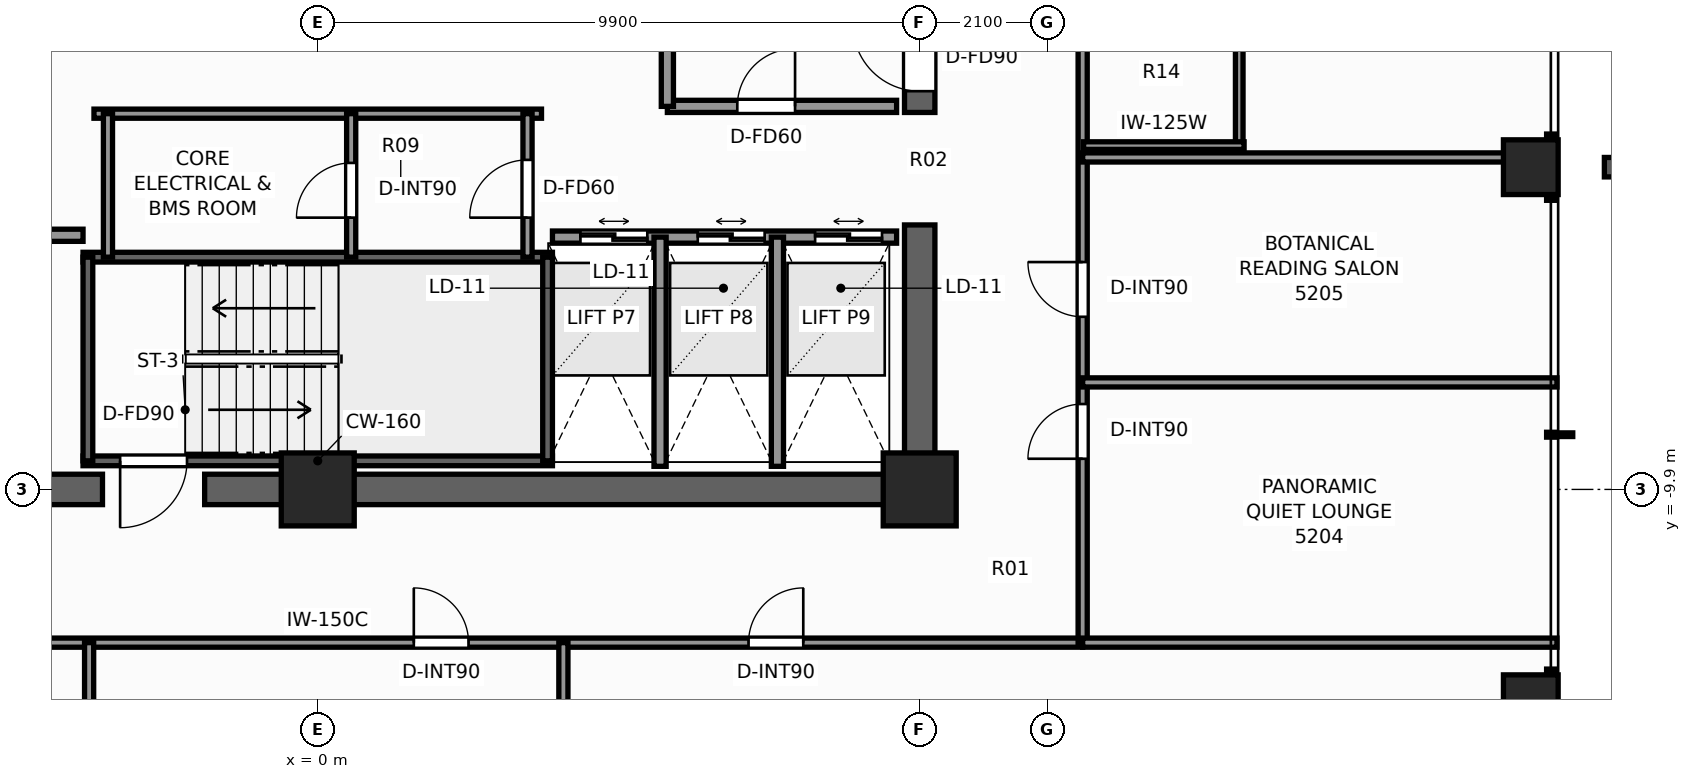
"""IFC4 building model, lengths in metres.
Left out: names, types, materials, properties, quantities, classifications, styles, units other than length and angle.
Written with IfcOpenShell. Run it as: python <this file> out.ifc"""

import sys

from ifc_helpers import new_model, si_unit, direction, frame, frame_2d, origin, origin_2d, place, context, subcontext, project, spatial, rectangle, extrude, element, fill, save


model = new_model("IFC4")
c1 = context("Model", 3, precision=1e-05, world=origin(), true_north=direction((0.0, 1.0)))
c2 = subcontext(c1, "Body", "Model", "MODEL_VIEW")
j1 = project(units=[si_unit("LENGTHUNIT", "METRE"), si_unit("PLANEANGLEUNIT", "RADIAN")], contexts=[c1])
p1 = place(None, origin())
s1 = spatial("IfcSite", under=j1, at=p1, CompositionType="ELEMENT")
p2 = place(p1, origin())
s2 = spatial("IfcBuilding", under=s1, at=p2, CompositionType="ELEMENT")
p3 = place(p2, frame((0.0, 0.0, 180.0)))
s3 = spatial("IfcBuildingStorey", under=s2, at=p3, CompositionType="ELEMENT", Elevation=180.0)
p4 = place(p3, frame((10.15, -9.9, 0.0), z_axis=(0.0, 0.0, 1.0), x_axis=(-1.0, 0.0, 0.0)))
e1 = element("IfcWall", 1, at=p4, inside=s3, PredefinedType="SHEAR", context=c2, shape_type="SweptSolid", body=[
    extrude(rectangle(XDim=12.01, YDim=0.5, at=frame_2d((6.005, 0.0))), origin(), (0.0, 0.0, 1.0), 3.3),
])
p5 = place(p3, frame((-3.54, -9.9, 0.0), z_axis=(0.0, 0.0, 1.0), x_axis=(-1.0, 0.0, 0.0)))
e2 = element("IfcWall", 2, at=p5, inside=s3, PredefinedType="SHEAR", context=c2, shape_type="SweptSolid", body=[
    extrude(rectangle(XDim=6.61, YDim=0.5, at=frame_2d((3.305, 0.0))), origin(), (0.0, 0.0, 1.0), 3.3),
])
p6 = place(p3, frame((9.9, -9.65, 0.0), z_axis=(0.0, 0.0, 1.0), x_axis=(0.0, 1.0, 0.0)))
e3 = element("IfcWall", 3, at=p6, inside=s3, PredefinedType="SHEAR", context=c2, shape_type="SweptSolid", body=[
    extrude(rectangle(XDim=4.1, YDim=0.5, at=frame_2d((2.05, 0.0))), origin(), (0.0, 0.0, 1.0), 3.3),
])
p7 = place(p3, frame((9.9, -3.7, 0.0), z_axis=(0.0, 0.0, 1.0), x_axis=(0.0, 1.0, 0.0)))
e4 = element("IfcWall", 4, at=p7, inside=s3, PredefinedType="SHEAR", context=c2, shape_type="SweptSolid", body=[
    extrude(rectangle(XDim=13.35, YDim=0.5, at=frame_2d((6.675, 0.0))), origin(), (0.0, 0.0, 1.0), 3.3),
])
p8 = place(p7, frame((0.35, 0.0, 0.0)))
e5 = element("IfcOpeningElement", 5, at=p8, cuts=e4, PredefinedType="OPENING", context=c2, shape_type="SweptSolid", body=[
    extrude(rectangle(XDim=1.1, YDim=2.2, at=frame_2d((0.55, 1.1))), frame((0.0, 0.26, 0.0), z_axis=(0.0, -1.0, 0.0), x_axis=(1.0, 0.0, 0.0)), (0.0, 0.0, 1.0), 0.52),
])
for number, where, z_axis, x_axis in (
    (6, (9.9, -9.9, 0.0), (0.0, 0.0, 1.0), (1.0, 0.0, 0.0)),
    (7, (0.0, -9.9, 0.0), (0.0, 0.0, 1.0), (1.0, 0.0, 0.0)),
):
    element("IfcColumn", number, at=place(p3, frame(where, z_axis=z_axis, x_axis=x_axis)), inside=s3, PredefinedType="COLUMN", context=c2, shape_type="SweptSolid", body=[
        extrude(rectangle(XDim=1.2, YDim=1.2, at=origin_2d()), origin(), (0.0, 0.0, 1.0), 3.3),
    ])
for number, where, z_axis, x_axis in (
    (8, (19.95, -13.4, 0.0), (0.0, 0.0, 1.0), (1.0, 0.0, 0.0)),
    (9, (19.95, -4.6, 0.0), (0.0, 0.0, 1.0), (1.0, 0.0, 0.0)),
):
    element("IfcColumn", number, at=place(p3, frame(where, z_axis=z_axis, x_axis=x_axis)), inside=s3, PredefinedType="COLUMN", context=c2, shape_type="SweptSolid", body=[
        extrude(rectangle(XDim=0.9, YDim=0.9, at=origin_2d()), origin(), (0.0, 0.0, 1.0), 3.3),
    ])
p9 = place(p3, frame((3.86, -9.43, 0.0), z_axis=(0.0, 0.0, 1.0), x_axis=(-1.0, 0.0, 0.0)))
e10 = element("IfcWall", 10, at=p9, inside=s3, PredefinedType="SHEAR", context=c2, shape_type="SweptSolid", body=[
    extrude(rectangle(XDim=7.72, YDim=0.16, at=frame_2d((3.86, 0.0))), origin(), (0.0, 0.0, 1.0), 3.3),
])
p10 = place(p9, frame((6.01, 0.0, 0.0)))
e11 = element("IfcOpeningElement", 11, at=p10, cuts=e10, PredefinedType="OPENING", context=c2, shape_type="SweptSolid", body=[
    extrude(rectangle(XDim=1.1, YDim=2.2, at=frame_2d((0.55, 1.1))), frame((0.0, 0.09, 0.0), z_axis=(0.0, -1.0, 0.0), x_axis=(1.0, 0.0, 0.0)), (0.0, 0.0, 1.0), 0.18),
])
p11 = place(p3, frame((-3.86, -6.08, 0.0), z_axis=(0.0, 0.0, 1.0), x_axis=(1.0, 0.0, 0.0)))
e12 = element("IfcWall", 12, at=p11, inside=s3, PredefinedType="SHEAR", context=c2, shape_type="SweptSolid", body=[
    extrude(rectangle(XDim=7.72, YDim=0.16, at=frame_2d((3.86, 0.0))), origin(), (0.0, 0.0, 1.0), 3.3),
])
for number, where, z_axis, x_axis in (
    (13, (-3.78, -9.43, 0.0), (0.0, 0.0, 1.0), (0.0, 1.0, 0.0)),
    (14, (3.78, -9.43, 0.0), (0.0, 0.0, 1.0), (0.0, 1.0, 0.0)),
):
    element("IfcWall", number, at=place(p3, frame(where, z_axis=z_axis, x_axis=x_axis)), inside=s3, PredefinedType="SHEAR", context=c2, shape_type="SweptSolid", body=[
        extrude(rectangle(XDim=3.35, YDim=0.16, at=frame_2d((1.675, 0.0))), origin(), (0.0, 0.0, 1.0), 3.3),
    ])
p12 = place(p3, frame((5.75, -3.6, 0.0), z_axis=(0.0, 0.0, 1.0), x_axis=(1.0, 0.0, 0.0)))
e15 = element("IfcWall", 15, at=p12, inside=s3, PredefinedType="SOLIDWALL", context=c2, shape_type="SweptSolid", body=[
    extrude(rectangle(XDim=3.77, YDim=0.2, at=frame_2d((1.885, 0.0))), origin(), (0.0, 0.0, 1.0), 3.08),
])
p13 = place(p12, frame((1.15, 0.0, 0.0)))
e16 = element("IfcOpeningElement", 16, at=p13, cuts=e15, PredefinedType="OPENING", context=c2, shape_type="SweptSolid", body=[
    extrude(rectangle(XDim=0.95, YDim=2.06, at=frame_2d((0.475, 1.03))), frame((0.0, 0.11, 0.0), z_axis=(0.0, -1.0, 0.0), x_axis=(1.0, 0.0, 0.0)), (0.0, 0.0, 1.0), 0.22),
])
p14 = place(p3, frame((5.75, -3.6, 0.0), z_axis=(0.0, 0.0, 1.0), x_axis=(0.0, 1.0, 0.0)))
e17 = element("IfcWall", 17, at=p14, inside=s3, PredefinedType="SOLIDWALL", context=c2, shape_type="SweptSolid", body=[
    extrude(rectangle(XDim=5.57, YDim=0.2, at=frame_2d((2.785, 0.0))), origin(), (0.0, 0.0, 1.0), 2.715),
])
p15 = place(p14, frame((2.75, 0.0, 0.0)))
e18 = element("IfcOpeningElement", 18, at=p15, cuts=e17, PredefinedType="OPENING", context=c2, shape_type="SweptSolid", body=[
    extrude(rectangle(XDim=1.1, YDim=2.2, at=frame_2d((0.55, 1.1))), frame((0.0, 0.11, 0.0), z_axis=(0.0, -1.0, 0.0), x_axis=(1.0, 0.0, 0.0)), (0.0, 0.0, 1.0), 0.22),
])
p16 = place(p3, frame((-9.52, -5.72, 0.0), z_axis=(0.0, 0.0, 1.0), x_axis=(1.0, 0.0, 0.0)))
e19 = element("IfcWall", 19, at=p16, inside=s3, PredefinedType="SOLIDWALL", context=c2, shape_type="SweptSolid", body=[
    extrude(rectangle(XDim=5.66, YDim=0.2, at=frame_2d((2.83, 0.0))), origin(), (0.0, 0.0, 1.0), 3.08),
])
p17 = place(p16, frame((3.6, 0.0, 0.0)))
e20 = element("IfcOpeningElement", 20, at=p17, cuts=e19, PredefinedType="OPENING", context=c2, shape_type="SweptSolid", body=[
    extrude(rectangle(XDim=0.95, YDim=2.06, at=frame_2d((0.475, 1.03))), frame((0.0, 0.11, 0.0), z_axis=(0.0, -1.0, 0.0), x_axis=(1.0, 0.0, 0.0)), (0.0, 0.0, 1.0), 0.22),
])
p18 = place(p3, frame((3.86, -5.75, 0.0), z_axis=(0.0, 0.0, 1.0), x_axis=(1.0, 0.0, 0.0)))
e21 = element("IfcWall", 21, at=p18, inside=s3, PredefinedType="SOLIDWALL", context=c2, shape_type="SweptSolid", body=[
    extrude(rectangle(XDim=5.66, YDim=0.2, at=frame_2d((2.83, 0.0))), origin(), (0.0, 0.0, 1.0), 3.08),
])
p19 = place(p18, frame((0.46, 0.0, 0.0)))
e22 = element("IfcOpeningElement", 22, at=p19, cuts=e21, PredefinedType="OPENING", context=c2, shape_type="SweptSolid", body=[
    extrude(rectangle(XDim=1.1, YDim=2.2, at=frame_2d((0.55, 1.1))), frame((0.0, 0.11, 0.0), z_axis=(0.0, -1.0, 0.0), x_axis=(1.0, 0.0, 0.0)), (0.0, 0.0, 1.0), 0.22),
])
p20 = place(p18, frame((2.39, 0.0, 0.0)))
e23 = element("IfcOpeningElement", 23, at=p20, cuts=e21, PredefinedType="OPENING", context=c2, shape_type="SweptSolid", body=[
    extrude(rectangle(XDim=1.1, YDim=2.2, at=frame_2d((0.55, 1.1))), frame((0.0, 0.11, 0.0), z_axis=(0.0, -1.0, 0.0), x_axis=(1.0, 0.0, 0.0)), (0.0, 0.0, 1.0), 0.22),
])
p21 = place(p18, frame((4.32, 0.0, 0.0)))
e24 = element("IfcOpeningElement", 24, at=p21, cuts=e21, PredefinedType="OPENING", context=c2, shape_type="SweptSolid", body=[
    extrude(rectangle(XDim=1.1, YDim=2.2, at=frame_2d((0.55, 1.1))), frame((0.0, 0.11, 0.0), z_axis=(0.0, -1.0, 0.0), x_axis=(1.0, 0.0, 0.0)), (0.0, 0.0, 1.0), 0.22),
])
for number, where, z_axis, x_axis in (
    (25, (5.63, -9.52, 0.0), (0.0, 0.0, 1.0), (0.0, 1.0, 0.0)),
    (26, (7.56, -9.52, 0.0), (0.0, 0.0, 1.0), (0.0, 1.0, 0.0)),
):
    element("IfcWall", number, at=place(p3, frame(where, z_axis=z_axis, x_axis=x_axis)), inside=s3, PredefinedType="SOLIDWALL", context=c2, shape_type="SweptSolid", body=[
        extrude(rectangle(XDim=3.77, YDim=0.2, at=frame_2d((1.885, 0.0))), origin(), (0.0, 0.0, 1.0), 3.08),
    ])
p22 = place(p3, frame((-3.68, -3.72, 0.0), z_axis=(0.0, 0.0, 1.0), x_axis=(1.0, 0.0, 0.0)))
e27 = element("IfcWall", 27, at=p22, inside=s3, PredefinedType="PARTITIONING", context=c2, shape_type="SweptSolid", body=[
    extrude(rectangle(XDim=7.36, YDim=0.15, at=frame_2d((3.68, 0.0))), origin(), (0.0, 0.0, 1.0), 3.08),
])
p23 = place(p3, frame((3.45, -6.08, 0.0), z_axis=(0.0, 0.0, 1.0), x_axis=(0.0, 1.0, 0.0)))
e28 = element("IfcWall", 28, at=p23, inside=s3, PredefinedType="PARTITIONING", context=c2, shape_type="SweptSolid", body=[
    extrude(rectangle(XDim=2.36, YDim=0.15, at=frame_2d((1.18, 0.0))), origin(), (0.0, 0.0, 1.0), 3.08),
])
p24 = place(p23, frame((0.65, 0.0, 0.0)))
e29 = element("IfcOpeningElement", 29, at=p24, cuts=e28, PredefinedType="OPENING", context=c2, shape_type="SweptSolid", body=[
    extrude(rectangle(XDim=0.95, YDim=2.06, at=frame_2d((0.475, 1.03))), frame((0.0, 0.085, 0.0), z_axis=(0.0, -1.0, 0.0), x_axis=(1.0, 0.0, 0.0)), (0.0, 0.0, 1.0), 0.17),
])
p25 = place(p3, frame((-3.45, -6.08, 0.0), z_axis=(0.0, 0.0, 1.0), x_axis=(0.0, 1.0, 0.0)))
e30 = element("IfcWall", 30, at=p25, inside=s3, PredefinedType="PARTITIONING", context=c2, shape_type="SweptSolid", body=[
    extrude(rectangle(XDim=2.36, YDim=0.15, at=frame_2d((1.18, 0.0))), origin(), (0.0, 0.0, 1.0), 3.08),
])
p26 = place(p3, frame((0.55, -6.08, 0.0), z_axis=(0.0, 0.0, 1.0), x_axis=(0.0, 1.0, 0.0)))
e31 = element("IfcWall", 31, at=p26, inside=s3, PredefinedType="PARTITIONING", context=c2, shape_type="SweptSolid", body=[
    extrude(rectangle(XDim=2.36, YDim=0.15, at=frame_2d((1.18, 0.0))), origin(), (0.0, 0.0, 1.0), 3.08),
])
p27 = place(p26, frame((0.65, 0.0, 0.0)))
e32 = element("IfcOpeningElement", 32, at=p27, cuts=e31, PredefinedType="OPENING", context=c2, shape_type="SweptSolid", body=[
    extrude(rectangle(XDim=0.9, YDim=2.06, at=frame_2d((0.45, 1.03))), frame((0.0, 0.085, 0.0), z_axis=(0.0, -1.0, 0.0), x_axis=(1.0, 0.0, 0.0)), (0.0, 0.0, 1.0), 0.17),
])
p28 = place(p3, frame((-12.26, -12.42, 0.0), z_axis=(0.0, 0.0, 1.0), x_axis=(1.0, 0.0, 0.0)))
e33 = element("IfcWall", 33, at=p28, inside=s3, PredefinedType="PARTITIONING", context=c2, shape_type="SweptSolid", body=[
    extrude(rectangle(XDim=24.84, YDim=0.15, at=frame_2d((12.42, 0.0))), origin(), (0.0, 0.0, 1.0), 2.369),
])
p29 = place(p28, frame((4.275, 0.0, 0.0)))
e34 = element("IfcOpeningElement", 34, at=p29, cuts=e33, PredefinedType="OPENING", context=c2, shape_type="SweptSolid", body=[
    extrude(rectangle(XDim=0.9, YDim=2.06, at=frame_2d((0.45, 1.03))), frame((0.0, 0.085, 0.0), z_axis=(0.0, -1.0, 0.0), x_axis=(1.0, 0.0, 0.0)), (0.0, 0.0, 1.0), 0.17),
])
p30 = place(p28, frame((13.84, 0.0, 0.0)))
e35 = element("IfcOpeningElement", 35, at=p30, cuts=e33, PredefinedType="OPENING", context=c2, shape_type="SweptSolid", body=[
    extrude(rectangle(XDim=0.9, YDim=2.06, at=frame_2d((0.45, 1.03))), frame((0.0, 0.085, 0.0), z_axis=(0.0, -1.0, 0.0), x_axis=(1.0, 0.0, 0.0)), (0.0, 0.0, 1.0), 0.17),
])
p31 = place(p28, frame((19.345, 0.0, 0.0)))
e36 = element("IfcOpeningElement", 36, at=p31, cuts=e33, PredefinedType="OPENING", context=c2, shape_type="SweptSolid", body=[
    extrude(rectangle(XDim=0.9, YDim=2.06, at=frame_2d((0.45, 1.03))), frame((0.0, 0.085, 0.0), z_axis=(0.0, -1.0, 0.0), x_axis=(1.0, 0.0, 0.0)), (0.0, 0.0, 1.0), 0.17),
])
p32 = place(p3, frame((12.58, -12.42, 0.0), z_axis=(0.0, 0.0, 1.0), x_axis=(0.0, 1.0, 0.0)))
e37 = element("IfcWall", 37, at=p32, inside=s3, PredefinedType="PARTITIONING", context=c2, shape_type="SweptSolid", body=[
    extrude(rectangle(XDim=24.84, YDim=0.15, at=frame_2d((12.42, 0.0))), origin(), (0.0, 0.0, 1.0), 2.369),
])
p33 = place(p32, frame((3.024, 0.0, 0.0)))
e38 = element("IfcOpeningElement", 38, at=p33, cuts=e37, PredefinedType="OPENING", context=c2, shape_type="SweptSolid", body=[
    extrude(rectangle(XDim=0.9, YDim=2.06, at=frame_2d((0.45, 1.03))), frame((0.0, 0.085, 0.0), z_axis=(0.0, -1.0, 0.0), x_axis=(1.0, 0.0, 0.0)), (0.0, 0.0, 1.0), 0.17),
])
p34 = place(p32, frame((5.359, 0.0, 0.0)))
e39 = element("IfcOpeningElement", 39, at=p34, cuts=e37, PredefinedType="OPENING", context=c2, shape_type="SweptSolid", body=[
    extrude(rectangle(XDim=0.9, YDim=2.06, at=frame_2d((0.45, 1.03))), frame((0.0, 0.085, 0.0), z_axis=(0.0, -1.0, 0.0), x_axis=(1.0, 0.0, 0.0)), (0.0, 0.0, 1.0), 0.17),
])
p35 = place(p32, frame((11.067, 0.0, 0.0)))
e40 = element("IfcOpeningElement", 40, at=p35, cuts=e37, PredefinedType="OPENING", context=c2, shape_type="SweptSolid", body=[
    extrude(rectangle(XDim=0.95, YDim=2.06, at=frame_2d((0.475, 1.03))), frame((0.0, 0.085, 0.0), z_axis=(0.0, -1.0, 0.0), x_axis=(1.0, 0.0, 0.0)), (0.0, 0.0, 1.0), 0.17),
])
p36 = place(p32, frame((18.038, 0.0, 0.0)))
e41 = element("IfcOpeningElement", 41, at=p36, cuts=e37, PredefinedType="OPENING", context=c2, shape_type="SweptSolid", body=[
    extrude(rectangle(XDim=0.95, YDim=2.06, at=frame_2d((0.475, 1.03))), frame((0.0, 0.085, 0.0), z_axis=(0.0, -1.0, 0.0), x_axis=(1.0, 0.0, 0.0)), (0.0, 0.0, 1.0), 0.17),
])
p37 = place(p32, frame((20.184, 0.0, 0.0)))
e42 = element("IfcOpeningElement", 42, at=p37, cuts=e37, PredefinedType="OPENING", context=c2, shape_type="SweptSolid", body=[
    extrude(rectangle(XDim=0.95, YDim=2.06, at=frame_2d((0.475, 1.03))), frame((0.0, 0.085, 0.0), z_axis=(0.0, -1.0, 0.0), x_axis=(1.0, 0.0, 0.0)), (0.0, 0.0, 1.0), 0.17),
])
p38 = place(p3, frame((12.58, -12.42, 0.0), z_axis=(0.0, 0.0, 1.0), x_axis=(1.0, 0.0, 0.0)))
e43 = element("IfcWall", 43, at=p38, inside=s3, PredefinedType="PARTITIONING", context=c2, shape_type="SweptSolid", body=[
    extrude(rectangle(XDim=7.8, YDim=0.15, at=frame_2d((3.9, 0.0))), origin(), (0.0, 0.0, 1.0), 2.369),
])
for number, where, z_axis, x_axis in (
    (44, (-3.76, -20.38, 0.0), (0.0, 0.0, 1.0), (0.0, 1.0, 0.0)),
    (45, (4.04, -20.38, 0.0), (0.0, 0.0, 1.0), (0.0, 1.0, 0.0)),
):
    element("IfcWall", number, at=place(p3, frame(where, z_axis=z_axis, x_axis=x_axis)), inside=s3, PredefinedType="PARTITIONING", context=c2, shape_type="SweptSolid", body=[
        extrude(rectangle(XDim=7.96, YDim=0.15, at=frame_2d((3.98, 0.0))), origin(), (0.0, 0.0, 1.0), 2.453),
    ])
p39 = place(p3, frame((12.58, -8.14, 0.0), z_axis=(0.0, 0.0, 1.0), x_axis=(1.0, 0.0, 0.0)))
e46 = element("IfcWall", 46, at=p39, inside=s3, PredefinedType="PARTITIONING", context=c2, shape_type="SweptSolid", body=[
    extrude(rectangle(XDim=7.8, YDim=0.15, at=frame_2d((3.9, 0.0))), origin(), (0.0, 0.0, 1.0), 2.453),
])
p40 = place(p3, frame((12.58, -4.44, 0.0), z_axis=(0.0, 0.0, 1.0), x_axis=(1.0, 0.0, 0.0)))
e47 = element("IfcWall", 47, at=p40, inside=s3, PredefinedType="PARTITIONING", context=c2, shape_type="SweptSolid", body=[
    extrude(rectangle(XDim=7.8, YDim=0.15, at=frame_2d((3.9, 0.0))), origin(), (0.0, 0.0, 1.0), 2.369),
])
p41 = place(p3, frame((15.155, -4.305, 0.0), z_axis=(0.0, 0.0, 1.0), x_axis=(0.0, 1.0, 0.0)))
e48 = element("IfcWall", 48, at=p41, inside=s3, PredefinedType="PARTITIONING", context=c2, shape_type="SweptSolid", body=[
    extrude(rectangle(XDim=2.52, YDim=0.125, at=frame_2d((1.26, 0.0))), origin(), (0.0, 0.0, 1.0), 2.369),
])
p42 = place(p3, frame((12.595, -4.245, 0.0), z_axis=(0.0, 0.0, 1.0), x_axis=(1.0, 0.0, 0.0)))
e49 = element("IfcWall", 49, at=p42, inside=s3, PredefinedType="PARTITIONING", context=c2, shape_type="SweptSolid", body=[
    extrude(rectangle(XDim=2.64, YDim=0.125, at=frame_2d((1.32, 0.0))), origin(), (0.0, 0.0, 1.0), 3.08),
])
p43 = place(p10, origin())
e50 = element("IfcDoor", 50, at=p43, inside=s3, OperationType="SINGLE_SWING_RIGHT", PredefinedType="DOOR", context=c2, shape_type="SweptSolid", body=[
    extrude(rectangle(XDim=1.1, YDim=2.2, at=frame_2d((0.55, 1.1))), frame((0.0, 0.025, 0.0), z_axis=(0.0, -1.0, 0.0), x_axis=(1.0, 0.0, 0.0)), (0.0, 0.0, 1.0), 0.05),
])
fill(e11, e50)
p44 = place(p8, origin())
e51 = element("IfcDoor", 51, at=p44, inside=s3, OperationType="SINGLE_SWING_RIGHT", PredefinedType="DOOR", context=c2, shape_type="SweptSolid", body=[
    extrude(rectangle(XDim=1.1, YDim=2.2, at=frame_2d((0.55, 1.1))), frame((0.0, 0.025, 0.0), z_axis=(0.0, -1.0, 0.0), x_axis=(1.0, 0.0, 0.0)), (0.0, 0.0, 1.0), 0.05),
])
fill(e5, e51)
p45 = place(p19, origin())
e52 = element("IfcDoor", 52, at=p45, inside=s3, OperationType="DOUBLE_DOOR_SLIDING", PredefinedType="DOOR", context=c2, shape_type="SweptSolid", body=[
    extrude(rectangle(XDim=1.1, YDim=2.2, at=frame_2d((0.55, 1.1))), frame((0.0, 0.025, 0.0), z_axis=(0.0, -1.0, 0.0), x_axis=(1.0, 0.0, 0.0)), (0.0, 0.0, 1.0), 0.05),
])
fill(e22, e52)
p46 = place(p20, origin())
e53 = element("IfcDoor", 53, at=p46, inside=s3, OperationType="DOUBLE_DOOR_SLIDING", PredefinedType="DOOR", context=c2, shape_type="SweptSolid", body=[
    extrude(rectangle(XDim=1.1, YDim=2.2, at=frame_2d((0.55, 1.1))), frame((0.0, 0.025, 0.0), z_axis=(0.0, -1.0, 0.0), x_axis=(1.0, 0.0, 0.0)), (0.0, 0.0, 1.0), 0.05),
])
fill(e23, e53)
p47 = place(p21, origin())
e54 = element("IfcDoor", 54, at=p47, inside=s3, OperationType="DOUBLE_DOOR_SLIDING", PredefinedType="DOOR", context=c2, shape_type="SweptSolid", body=[
    extrude(rectangle(XDim=1.1, YDim=2.2, at=frame_2d((0.55, 1.1))), frame((0.0, 0.025, 0.0), z_axis=(0.0, -1.0, 0.0), x_axis=(1.0, 0.0, 0.0)), (0.0, 0.0, 1.0), 0.05),
])
fill(e24, e54)
p48 = place(p13, origin())
e55 = element("IfcDoor", 55, at=p48, inside=s3, OperationType="SINGLE_SWING_RIGHT", PredefinedType="DOOR", context=c2, shape_type="SweptSolid", body=[
    extrude(rectangle(XDim=0.95, YDim=2.06, at=frame_2d((0.475, 1.03))), frame((0.0, 0.025, 0.0), z_axis=(0.0, -1.0, 0.0), x_axis=(1.0, 0.0, 0.0)), (0.0, 0.0, 1.0), 0.05),
])
fill(e16, e55)
p49 = place(p24, origin())
e56 = element("IfcDoor", 56, at=p49, inside=s3, OperationType="SINGLE_SWING_LEFT", PredefinedType="DOOR", context=c2, shape_type="SweptSolid", body=[
    extrude(rectangle(XDim=0.95, YDim=2.06, at=frame_2d((0.475, 1.03))), frame((0.0, 0.025, 0.0), z_axis=(0.0, -1.0, 0.0), x_axis=(1.0, 0.0, 0.0)), (0.0, 0.0, 1.0), 0.05),
])
fill(e29, e56)
p50 = place(p27, origin())
e57 = element("IfcDoor", 57, at=p50, inside=s3, OperationType="SINGLE_SWING_LEFT", PredefinedType="DOOR", context=c2, shape_type="SweptSolid", body=[
    extrude(rectangle(XDim=0.9, YDim=2.06, at=frame_2d((0.45, 1.03))), frame((0.0, 0.025, 0.0), z_axis=(0.0, -1.0, 0.0), x_axis=(1.0, 0.0, 0.0)), (0.0, 0.0, 1.0), 0.05),
])
fill(e32, e57)
p51 = place(p30, origin())
e58 = element("IfcDoor", 58, at=p51, inside=s3, OperationType="SINGLE_SWING_LEFT", PredefinedType="DOOR", context=c2, shape_type="SweptSolid", body=[
    extrude(rectangle(XDim=0.9, YDim=2.06, at=frame_2d((0.45, 1.03))), frame((0.0, 0.025, 0.0), z_axis=(0.0, -1.0, 0.0), x_axis=(1.0, 0.0, 0.0)), (0.0, 0.0, 1.0), 0.05),
])
fill(e35, e58)
p52 = place(p31, origin())
e59 = element("IfcDoor", 59, at=p52, inside=s3, OperationType="SINGLE_SWING_RIGHT", PredefinedType="DOOR", context=c2, shape_type="SweptSolid", body=[
    extrude(rectangle(XDim=0.9, YDim=2.06, at=frame_2d((0.45, 1.03))), frame((0.0, 0.025, 0.0), z_axis=(0.0, -1.0, 0.0), x_axis=(1.0, 0.0, 0.0)), (0.0, 0.0, 1.0), 0.05),
])
fill(e36, e59)
p53 = place(p33, origin())
e60 = element("IfcDoor", 60, at=p53, inside=s3, OperationType="SINGLE_SWING_LEFT", PredefinedType="DOOR", context=c2, shape_type="SweptSolid", body=[
    extrude(rectangle(XDim=0.9, YDim=2.06, at=frame_2d((0.45, 1.03))), frame((0.0, 0.025, 0.0), z_axis=(0.0, -1.0, 0.0), x_axis=(1.0, 0.0, 0.0)), (0.0, 0.0, 1.0), 0.05),
])
fill(e38, e60)
p54 = place(p34, origin())
e61 = element("IfcDoor", 61, at=p54, inside=s3, OperationType="SINGLE_SWING_RIGHT", PredefinedType="DOOR", context=c2, shape_type="SweptSolid", body=[
    extrude(rectangle(XDim=0.9, YDim=2.06, at=frame_2d((0.45, 1.03))), frame((0.0, 0.025, 0.0), z_axis=(0.0, -1.0, 0.0), x_axis=(1.0, 0.0, 0.0)), (0.0, 0.0, 1.0), 0.05),
])
fill(e39, e61)
save(model, sys.argv[1])
